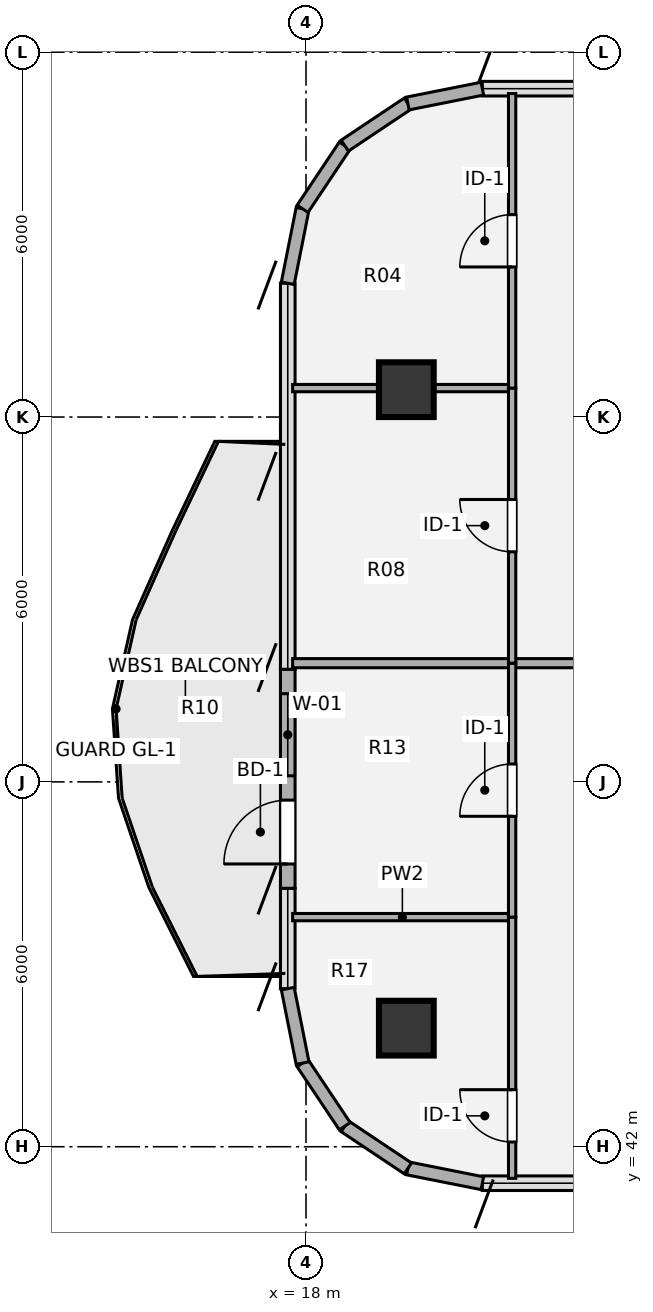
"""IFC4 building model, lengths in metres.
Left out: names, types, materials, properties, quantities, classifications, styles, units other than length and angle.
Written with IfcOpenShell. Run it as: python <this file> out.ifc"""

import sys

from ifc_helpers import new_model, si_unit, direction, frame, frame_2d, origin, origin_2d, place, context, subcontext, project, spatial, rectangle, hollow_circle, extrude, source, transform, mapped, element, fill, save


model = new_model("IFC4")
c1 = context("Model", 3, precision=1e-05, world=origin(), true_north=direction((0.0, 1.0)))
c2 = subcontext(c1, "Body", "Model", "MODEL_VIEW")
j1 = project(units=[si_unit("LENGTHUNIT", "METRE"), si_unit("PLANEANGLEUNIT", "RADIAN")], contexts=[c1])
p1 = place(None, origin())
s1 = spatial("IfcSite", under=j1, at=p1, CompositionType="ELEMENT")
p2 = place(p1, origin())
s2 = spatial("IfcBuilding", under=s1, at=p2, CompositionType="ELEMENT")
p3 = place(p2, frame((0.0, 0.0, 230.58)))
s3 = spatial("IfcBuildingStorey", under=s2, at=p3, CompositionType="ELEMENT", Elevation=230.58)
m1 = source(origin(), c2, "Body", "SweptSolid", [
    extrude(hollow_circle(Radius=0.45, WallThickness=0.032, at=origin_2d()), origin(), (0.0, 0.0, 1.0), 3.78),
])
for number, where, z_axis, x_axis in (
    (1, (19.65, 43.95, 0.0), (0.0, 0.0, 1.0), (1.0, 0.0, 0.0)),
    (2, (19.65, 54.45, 0.0), (0.0, 0.0, 1.0), (1.0, 0.0, 0.0)),
):
    element("IfcColumn", number, at=place(p3, frame(where, z_axis=z_axis, x_axis=x_axis)), inside=s3, PredefinedType="COLUMN", context=c2, shape_type="MappedRepresentation", body=[
        mapped(m1, transform((0.0, 0.0, 0.0), x_axis=(1.0, 0.0, 0.0), y_axis=(0.0, 1.0, 0.0), z_axis=(0.0, 0.0, 1.0), scale=1.0)),
    ])
for number, where, z_axis, x_axis in (
    (3, (20.9, 41.4, 0.0), (0.0, 0.0, 1.0), (-0.981, 0.195, 0.0)),
    (4, (19.675, 41.644, 0.0), (0.0, 0.0, 1.0), (-0.831, 0.556, 0.0)),
    (5, (18.637, 42.337, 0.0), (0.0, 0.0, 1.0), (-0.556, 0.831, 0.0)),
    (6, (17.944, 43.375, 0.0), (0.0, 0.0, 1.0), (-0.195, 0.981, 0.0)),
):
    element("IfcWall", number, at=place(p3, frame(where, z_axis=z_axis, x_axis=x_axis)), inside=s3, PredefinedType="SOLIDWALL", context=c2, shape_type="SweptSolid", body=[
        extrude(rectangle(XDim=1.249, YDim=0.215, at=frame_2d((0.624, 0.0))), origin(), (0.0, 0.0, 1.0), 3.53),
    ])
p4 = place(p3, frame((17.7, 46.25, 0.0), z_axis=(0.0, 0.0, 1.0), x_axis=(0.0, 1.0, 0.0)))
e7 = element("IfcWall", 7, at=p4, inside=s3, PredefinedType="SOLIDWALL", context=c2, shape_type="SweptSolid", body=[
    extrude(rectangle(XDim=3.6, YDim=0.24, at=frame_2d((1.8, 0.0))), origin(), (0.0, 0.0, 1.0), 3.53),
])
p5 = place(p4, frame((0.4, 0.0, 0.0)))
e8 = element("IfcOpeningElement", 8, at=p5, cuts=e7, PredefinedType="OPENING", context=c2, shape_type="SweptSolid", body=[
    extrude(rectangle(XDim=1.05, YDim=2.15, at=origin_2d()), frame((0.525, 0.13, 1.075), z_axis=(0.0, -1.0, 0.0), x_axis=(1.0, 0.0, 0.0)), (0.0, 0.0, 1.0), 0.26),
])
p6 = place(p4, frame((1.85, 0.0, 0.85)))
e9 = element("IfcOpeningElement", 9, at=p6, cuts=e7, PredefinedType="OPENING", context=c2, shape_type="SweptSolid", body=[
    extrude(rectangle(XDim=1.35, YDim=1.35, at=origin_2d()), frame((0.675, 0.13, 0.675), z_axis=(0.0, -1.0, 0.0), x_axis=(1.0, 0.0, 0.0)), (0.0, 0.0, 1.0), 0.26),
])
for number, where, z_axis, x_axis in (
    (10, (17.7, 56.2, 0.0), (0.0, 0.0, 1.0), (0.195, 0.981, 0.0)),
    (11, (17.944, 57.425, 0.0), (0.0, 0.0, 1.0), (0.556, 0.831, 0.0)),
    (12, (18.637, 58.463, 0.0), (0.0, 0.0, 1.0), (0.831, 0.556, 0.0)),
    (13, (19.675, 59.156, 0.0), (0.0, 0.0, 1.0), (0.981, 0.195, 0.0)),
):
    element("IfcWall", number, at=place(p3, frame(where, z_axis=z_axis, x_axis=x_axis)), inside=s3, PredefinedType="SOLIDWALL", context=c2, shape_type="SweptSolid", body=[
        extrude(rectangle(XDim=1.249, YDim=0.215, at=frame_2d((0.624, 0.0))), origin(), (0.0, 0.0, 1.0), 3.53),
    ])
p7 = place(p3, frame((17.78, 45.776, 0.0), z_axis=(0.0, 0.0, 1.0), x_axis=(1.0, 0.0, 0.0)))
e14 = element("IfcWall", 14, at=p7, inside=s3, PredefinedType="PARTITIONING", context=c2, shape_type="SweptSolid", body=[
    extrude(rectangle(XDim=3.61, YDim=0.12, at=frame_2d((1.805, 0.0))), origin(), (0.0, 0.0, 1.0), 2.982),
])
p8 = place(p3, frame((17.78, 49.952, 0.0), z_axis=(0.0, 0.0, 1.0), x_axis=(1.0, 0.0, 0.0)))
e15 = element("IfcWall", 15, at=p8, inside=s3, PredefinedType="PARTITIONING", context=c2, shape_type="SweptSolid", body=[
    extrude(rectangle(XDim=15.77, YDim=0.15, at=frame_2d((7.885, 0.0))), origin(), (0.0, 0.0, 1.0), 2.982),
])
p9 = place(p3, frame((17.78, 54.476, 0.0), z_axis=(0.0, 0.0, 1.0), x_axis=(1.0, 0.0, 0.0)))
e16 = element("IfcWall", 16, at=p9, inside=s3, PredefinedType="PARTITIONING", context=c2, shape_type="SweptSolid", body=[
    extrude(rectangle(XDim=3.61, YDim=0.12, at=frame_2d((1.805, 0.0))), origin(), (0.0, 0.0, 1.0), 2.903),
])
p10 = place(p3, frame((21.39, 41.48, 0.0), z_axis=(0.0, 0.0, 1.0), x_axis=(0.0, 1.0, 0.0)))
e17 = element("IfcWall", 17, at=p10, inside=s3, PredefinedType="PARTITIONING", context=c2, shape_type="SweptSolid", body=[
    extrude(rectangle(XDim=4.296, YDim=0.12, at=frame_2d((2.148, 0.0))), origin(), (0.0, 0.0, 1.0), 3.5),
])
p11 = place(p10, frame((0.598, 0.0, 0.0)))
e18 = element("IfcOpeningElement", 18, at=p11, cuts=e17, PredefinedType="OPENING", context=c2, shape_type="SweptSolid", body=[
    extrude(rectangle(XDim=0.86, YDim=2.1, at=origin_2d()), frame((0.43, 0.07, 1.05), z_axis=(0.0, -1.0, 0.0), x_axis=(1.0, 0.0, 0.0)), (0.0, 0.0, 1.0), 0.14),
])
p12 = place(p3, frame((21.39, 45.776, 0.0), z_axis=(0.0, 0.0, 1.0), x_axis=(0.0, 1.0, 0.0)))
e19 = element("IfcWall", 19, at=p12, inside=s3, PredefinedType="PARTITIONING", context=c2, shape_type="SweptSolid", body=[
    extrude(rectangle(XDim=4.176, YDim=0.12, at=frame_2d((2.088, 0.0))), origin(), (0.0, 0.0, 1.0), 3.5),
])
p13 = place(p12, frame((1.658, 0.0, 0.0)))
e20 = element("IfcOpeningElement", 20, at=p13, cuts=e19, PredefinedType="OPENING", context=c2, shape_type="SweptSolid", body=[
    extrude(rectangle(XDim=0.86, YDim=2.1, at=origin_2d()), frame((0.43, 0.07, 1.05), z_axis=(0.0, -1.0, 0.0), x_axis=(1.0, 0.0, 0.0)), (0.0, 0.0, 1.0), 0.14),
])
p14 = place(p3, frame((21.39, 49.952, 0.0), z_axis=(0.0, 0.0, 1.0), x_axis=(0.0, 1.0, 0.0)))
e21 = element("IfcWall", 21, at=p14, inside=s3, PredefinedType="PARTITIONING", context=c2, shape_type="SweptSolid", body=[
    extrude(rectangle(XDim=4.524, YDim=0.12, at=frame_2d((2.262, 0.0))), origin(), (0.0, 0.0, 1.0), 3.5),
])
p15 = place(p14, frame((1.832, 0.0, 0.0)))
e22 = element("IfcOpeningElement", 22, at=p15, cuts=e21, PredefinedType="OPENING", context=c2, shape_type="SweptSolid", body=[
    extrude(rectangle(XDim=0.86, YDim=2.1, at=origin_2d()), frame((0.43, 0.07, 1.05), z_axis=(0.0, -1.0, 0.0), x_axis=(1.0, 0.0, 0.0)), (0.0, 0.0, 1.0), 0.14),
])
p16 = place(p3, frame((21.39, 54.476, 0.0), z_axis=(0.0, 0.0, 1.0), x_axis=(0.0, 1.0, 0.0)))
e23 = element("IfcWall", 23, at=p16, inside=s3, PredefinedType="PARTITIONING", context=c2, shape_type="SweptSolid", body=[
    extrude(rectangle(XDim=4.844, YDim=0.12, at=frame_2d((2.422, 0.0))), origin(), (0.0, 0.0, 1.0), 3.5),
])
p17 = place(p16, frame((1.992, 0.0, 0.0)))
e24 = element("IfcOpeningElement", 24, at=p17, cuts=e23, PredefinedType="OPENING", context=c2, shape_type="SweptSolid", body=[
    extrude(rectangle(XDim=0.86, YDim=2.1, at=origin_2d()), frame((0.43, 0.07, 1.05), z_axis=(0.0, -1.0, 0.0), x_axis=(1.0, 0.0, 0.0)), (0.0, 0.0, 1.0), 0.14),
])
m2 = source(origin(), c2, "Body", "SweptSolid", [
    extrude(rectangle(XDim=1.05, YDim=2.15, at=origin_2d()), frame((0.525, 0.025, 1.075), z_axis=(0.0, -1.0, 0.0), x_axis=(1.0, 0.0, 0.0)), (0.0, 0.0, 1.0), 0.05),
])
p18 = place(p5, origin())
e25 = element("IfcDoor", 25, at=p18, inside=s3, OperationType="SINGLE_SWING_LEFT", PredefinedType="DOOR", context=c2, shape_type="MappedRepresentation", body=[
    mapped(m2, transform((0.0, 0.0, 0.0), x_axis=(1.0, 0.0, 0.0), y_axis=(0.0, 1.0, 0.0), z_axis=(0.0, 0.0, 1.0), scale=1.0)),
])
fill(e8, e25)
m3 = source(origin(), c2, "Body", "SweptSolid", [
    extrude(rectangle(XDim=1.35, YDim=1.35, at=origin_2d()), frame((0.675, 0.03, 0.675), z_axis=(0.0, -1.0, 0.0), x_axis=(1.0, 0.0, 0.0)), (0.0, 0.0, 1.0), 0.06),
])
p19 = place(p6, origin())
e26 = element("IfcWindow", 26, at=p19, inside=s3, PartitioningType="SINGLE_PANEL", PredefinedType="WINDOW", context=c2, shape_type="MappedRepresentation", body=[
    mapped(m3, transform((0.0, 0.0, 0.0), x_axis=(1.0, 0.0, 0.0), y_axis=(0.0, 1.0, 0.0), z_axis=(0.0, 0.0, 1.0), scale=1.0)),
])
fill(e9, e26)
m4 = source(origin(), c2, "Body", "SweptSolid", [
    extrude(rectangle(XDim=0.86, YDim=2.1, at=origin_2d()), frame((0.43, 0.025, 1.05), z_axis=(0.0, -1.0, 0.0), x_axis=(1.0, 0.0, 0.0)), (0.0, 0.0, 1.0), 0.05),
])
p20 = place(p11, origin())
e27 = element("IfcDoor", 27, at=p20, inside=s3, OperationType="SINGLE_SWING_RIGHT", PredefinedType="DOOR", context=c2, shape_type="MappedRepresentation", body=[
    mapped(m4, transform((0.0, 0.0, 0.0), x_axis=(1.0, 0.0, 0.0), y_axis=(0.0, 1.0, 0.0), z_axis=(0.0, 0.0, 1.0), scale=1.0)),
])
fill(e18, e27)
p21 = place(p13, origin())
e28 = element("IfcDoor", 28, at=p21, inside=s3, OperationType="SINGLE_SWING_LEFT", PredefinedType="DOOR", context=c2, shape_type="MappedRepresentation", body=[
    mapped(m4, transform((0.0, 0.0, 0.0), x_axis=(1.0, 0.0, 0.0), y_axis=(0.0, 1.0, 0.0), z_axis=(0.0, 0.0, 1.0), scale=1.0)),
])
fill(e20, e28)
p22 = place(p15, origin())
e29 = element("IfcDoor", 29, at=p22, inside=s3, OperationType="SINGLE_SWING_RIGHT", PredefinedType="DOOR", context=c2, shape_type="MappedRepresentation", body=[
    mapped(m4, transform((0.0, 0.0, 0.0), x_axis=(1.0, 0.0, 0.0), y_axis=(0.0, 1.0, 0.0), z_axis=(0.0, 0.0, 1.0), scale=1.0)),
])
fill(e22, e29)
p23 = place(p17, origin())
e30 = element("IfcDoor", 30, at=p23, inside=s3, OperationType="SINGLE_SWING_LEFT", PredefinedType="DOOR", context=c2, shape_type="MappedRepresentation", body=[
    mapped(m4, transform((0.0, 0.0, 0.0), x_axis=(1.0, 0.0, 0.0), y_axis=(0.0, 1.0, 0.0), z_axis=(0.0, 0.0, 1.0), scale=1.0)),
])
fill(e24, e30)
save(model, sys.argv[1])
